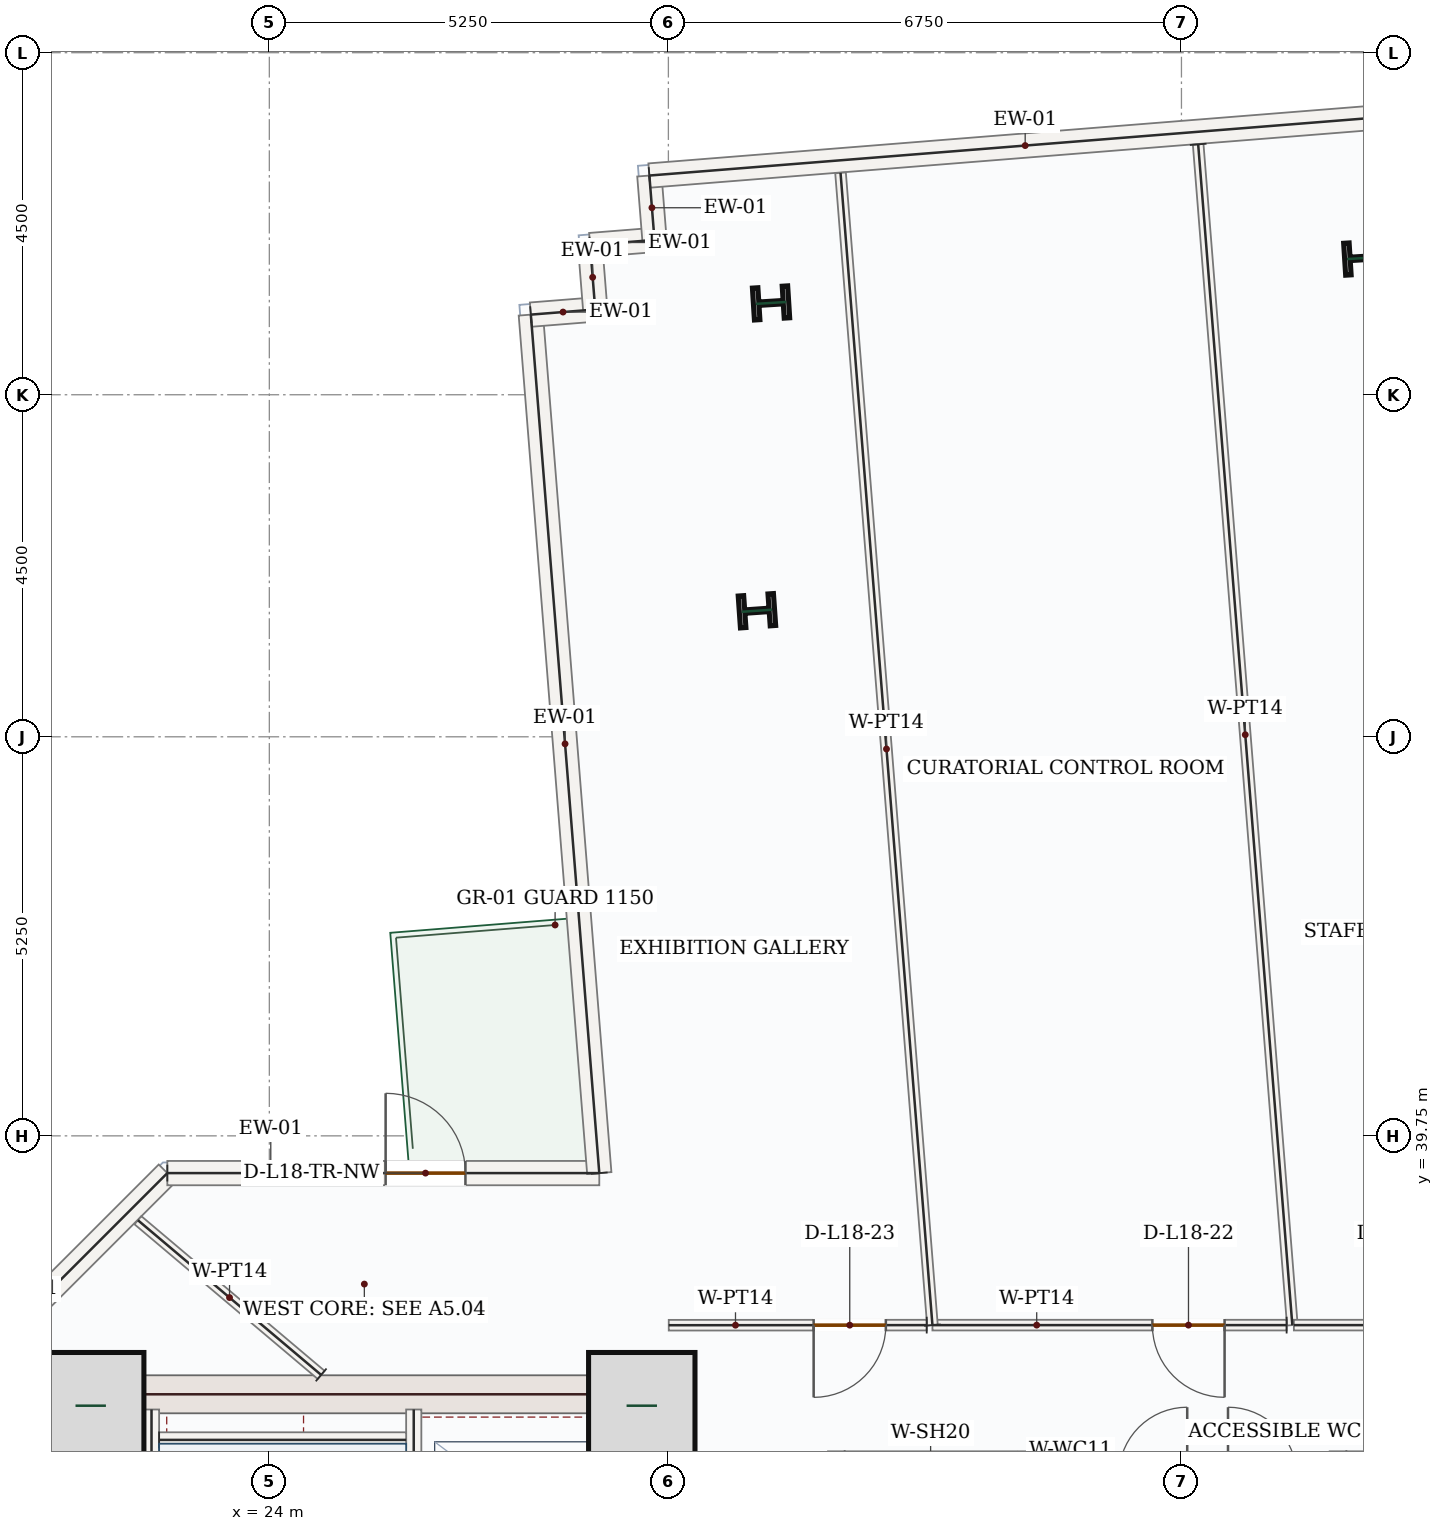
"""IFC4 building model, lengths in metres.
Left out: names, types, materials, properties, quantities, classifications, styles, units other than length and angle.
Written with IfcOpenShell. Run it as: python <this file> out.ifc"""

import sys

from ifc_helpers import new_model, si_unit, direction, frame, frame_2d, origin, origin_2d, place, context, subcontext, project, spatial, rectangle, i_section, extrude, source, transform, mapped, element, fill, save


model = new_model("IFC4")
c1 = context("Model", 3, precision=1e-05, world=origin(), true_north=direction((0.0, 1.0)))
c2 = subcontext(c1, "Body", "Model", "MODEL_VIEW")
j1 = project(units=[si_unit("LENGTHUNIT", "METRE"), si_unit("PLANEANGLEUNIT", "RADIAN")], contexts=[c1])
p1 = place(None, origin())
s1 = spatial("IfcSite", under=j1, at=p1, CompositionType="ELEMENT")
p2 = place(p1, origin())
s2 = spatial("IfcBuilding", under=s1, at=p2, CompositionType="ELEMENT")
p3 = place(p2, frame((0.0, 0.0, 83.7)))
s3 = spatial("IfcBuildingStorey", under=s2, at=p3, CompositionType="ELEMENT", Elevation=83.7)
m1 = source(origin(), c2, "Body", "SweptSolid", [
    extrude(rectangle(XDim=8.55, YDim=0.5, at=frame_2d((4.275, 0.0))), origin(), (0.0, 0.0, 1.0), 3.95),
])
p4 = place(p3, frame((21.5, 28.05, 0.0), z_axis=(0.0, 0.0, 1.0), x_axis=(0.0, 1.0, 0.0)))
e1 = element("IfcWall", 1, at=p4, inside=s3, PredefinedType="SHEAR", context=c2, shape_type="MappedRepresentation", body=[
    mapped(m1, transform((0.0, 0.0, 0.0), x_axis=(1.0, 0.0, 0.0), y_axis=(0.0, 1.0, 0.0), z_axis=(0.0, 0.0, 1.0), scale=1.0)),
])
p5 = place(p3, frame((29.0, 28.05, 0.0), z_axis=(0.0, 0.0, 1.0), x_axis=(0.0, 1.0, 0.0)))
e2 = element("IfcWall", 2, at=p5, inside=s3, PredefinedType="SHEAR", context=c2, shape_type="SweptSolid", body=[
    extrude(rectangle(XDim=8.55, YDim=0.5, at=frame_2d((4.275, 0.0))), origin(), (0.0, 0.0, 1.0), 3.95),
])
p6 = place(p5, frame((1.5, 0.0, 0.0)))
e3 = element("IfcOpeningElement", 3, at=p6, cuts=e2, PredefinedType="OPENING", context=c2, shape_type="SweptSolid", body=[
    extrude(rectangle(XDim=1.1, YDim=2.2, at=frame_2d((0.55, 1.1))), frame((0.0, 0.26, 0.0), z_axis=(0.0, -1.0, 0.0), x_axis=(1.0, 0.0, 0.0)), (0.0, 0.0, 1.0), 0.52),
])
m2 = source(origin(), c2, "Body", "SweptSolid", [
    extrude(rectangle(XDim=7.0, YDim=0.5, at=frame_2d((3.5, 0.0))), origin(), (0.0, 0.0, 1.0), 3.95),
])
p7 = place(p3, frame((21.75, 36.35, 0.0), z_axis=(0.0, 0.0, 1.0), x_axis=(1.0, 0.0, 0.0)))
e4 = element("IfcWall", 4, at=p7, inside=s3, PredefinedType="SHEAR", context=c2, shape_type="MappedRepresentation", body=[
    mapped(m2, transform((0.0, 0.0, 0.0), x_axis=(1.0, 0.0, 0.0), y_axis=(0.0, 1.0, 0.0), z_axis=(0.0, 0.0, 1.0), scale=1.0)),
])
m3 = source(origin(), c2, "Body", "SweptSolid", [
    extrude(rectangle(XDim=1.4, YDim=1.4, at=origin_2d()), origin(), (0.0, 0.0, 1.0), 4.2),
])
for number, where, z_axis, x_axis in (
    (5, (21.65, 36.2, 0.0), (0.0, 0.0, 1.0), (1.0, 0.0, 0.0)),
    (6, (28.9, 36.2, 0.0), (0.0, 0.0, 1.0), (1.0, 0.0, 0.0)),
):
    element("IfcColumn", number, at=place(p3, frame(where, z_axis=z_axis, x_axis=x_axis)), inside=s3, PredefinedType="COLUMN", context=c2, shape_type="MappedRepresentation", body=[
        mapped(m3, transform((0.0, 0.0, 0.0), x_axis=(1.0, 0.0, 0.0), y_axis=(0.0, 1.0, 0.0), z_axis=(0.0, 0.0, 1.0), scale=1.0)),
    ])
m4 = source(origin(), c2, "Body", "SweptSolid", [
    extrude(i_section(OverallWidth=0.421, OverallDepth=0.465, WebThickness=0.045, FlangeThickness=0.073, FilletRadius=0.018, at=origin_2d()), origin(), (0.0, 0.0, 1.0), 4.2),
])
for number, where, z_axis, x_axis in (
    (7, (30.415, 46.658, 0.0), (0.0, 0.0, 1.0), (-0.07, 0.998, 0.0)),
    (8, (38.379, 51.297, 0.0), (0.0, 0.0, 1.0), (-0.063, 0.998, 0.0)),
    (9, (30.601, 50.708, 0.0), (0.0, 0.0, 1.0), (-0.063, 0.998, 0.0)),
):
    element("IfcColumn", number, at=place(p3, frame(where, z_axis=z_axis, x_axis=x_axis)), inside=s3, PredefinedType="COLUMN", context=c2, shape_type="MappedRepresentation", body=[
        mapped(m4, transform((0.0, 0.0, 0.0), x_axis=(1.0, 0.0, 0.0), y_axis=(0.0, 1.0, 0.0), z_axis=(0.0, 0.0, 1.0), scale=1.0)),
    ])
m5 = source(origin(), c2, "Body", "SweptSolid", [
    extrude(rectangle(XDim=5.258, YDim=0.32, at=frame_2d((2.629, 0.0))), origin(), (0.0, 0.0, 1.0), 3.95),
])
p8 = place(p3, frame((18.94, 35.542, 0.0), z_axis=(0.0, 0.0, 1.0), x_axis=(0.707106781187, 0.707106781187, 0.0)))
e10 = element("IfcWall", 10, at=p8, inside=s3, PredefinedType="SOLIDWALL", context=c2, shape_type="MappedRepresentation", body=[
    mapped(m5, transform((0.0, 0.0, 0.0), x_axis=(1.0, 0.0, 0.0), y_axis=(0.0, 1.0, 0.0), z_axis=(0.0, 0.0, 1.0), scale=1.0)),
])
p9 = place(p3, frame((22.658, 39.26, 0.0), z_axis=(0.0, 0.0, 1.0), x_axis=(1.0, 0.0, 0.0)))
e11 = element("IfcWall", 11, at=p9, inside=s3, PredefinedType="SOLIDWALL", context=c2, shape_type="SweptSolid", body=[
    extrude(rectangle(XDim=5.683, YDim=0.32, at=frame_2d((2.842, 0.0))), origin(), (0.0, 0.0, 1.0), 3.95),
])
p10 = place(p9, frame((2.872, 0.0, 0.0)))
e12 = element("IfcOpeningElement", 12, at=p10, cuts=e11, PredefinedType="OPENING", context=c2, shape_type="SweptSolid", body=[
    extrude(rectangle(XDim=1.05, YDim=2.15, at=frame_2d((0.525, 1.075))), frame((0.0, 0.17, 0.0), z_axis=(0.0, -1.0, 0.0), x_axis=(1.0, 0.0, 0.0)), (0.0, 0.0, 1.0), 0.34),
])
m6 = source(origin(), c2, "Body", "SweptSolid", [
    extrude(rectangle(XDim=11.33, YDim=0.32, at=frame_2d((5.665, 0.0))), origin(), (0.0, 0.0, 1.0), 3.95),
])
p11 = place(p3, frame((28.341, 39.26, 0.0), z_axis=(0.0, 0.0, 1.0), x_axis=(-0.079512268319, 0.996833887459, 0.0)))
e13 = element("IfcWall", 13, at=p11, inside=s3, PredefinedType="SOLIDWALL", context=c2, shape_type="MappedRepresentation", body=[
    mapped(m6, transform((0.0, 0.0, 0.0), x_axis=(1.0, 0.0, 0.0), y_axis=(0.0, 1.0, 0.0), z_axis=(0.0, 0.0, 1.0), scale=1.0)),
])
m7 = source(origin(), c2, "Body", "SweptSolid", [
    extrude(rectangle(XDim=0.85, YDim=0.32, at=frame_2d((0.425, 0.0))), origin(), (0.0, 0.0, 1.0), 3.95),
])
for number, where, z_axis, x_axis in (
    (14, (27.44, 50.554, 0.0), (0.0, 0.0, 1.0), (0.997, 0.079, 0.0)),
    (15, (28.288, 50.622, 0.0), (0.0, 0.0, 1.0), (-0.08, 0.997, 0.0)),
    (16, (28.22, 51.469, 0.0), (0.0, 0.0, 1.0), (0.997, 0.08, 0.0)),
):
    element("IfcWall", number, at=place(p3, frame(where, z_axis=z_axis, x_axis=x_axis)), inside=s3, PredefinedType="SOLIDWALL", context=c2, shape_type="MappedRepresentation", body=[
        mapped(m7, transform((0.0, 0.0, 0.0), x_axis=(1.0, 0.0, 0.0), y_axis=(0.0, 1.0, 0.0), z_axis=(0.0, 0.0, 1.0), scale=1.0)),
    ])
m8 = source(origin(), c2, "Body", "SweptSolid", [
    extrude(rectangle(XDim=0.85, YDim=0.32, at=frame_2d((0.425, 0.0))), origin(), (0.0, 0.0, 1.0), 3.95),
])
p12 = place(p3, frame((29.067, 51.537, 0.0), z_axis=(0.0, 0.0, 1.0), x_axis=(-0.079573954853, 0.996828965123, 0.0)))
e17 = element("IfcWall", 17, at=p12, inside=s3, PredefinedType="SOLIDWALL", context=c2, shape_type="MappedRepresentation", body=[
    mapped(m8, transform((0.0, 0.0, 0.0), x_axis=(1.0, 0.0, 0.0), y_axis=(0.0, 1.0, 0.0), z_axis=(0.0, 0.0, 1.0), scale=1.0)),
])
m9 = source(origin(), c2, "Body", "SweptSolid", [
    extrude(rectangle(XDim=9.92, YDim=0.32, at=frame_2d((4.96, 0.0))), origin(), (0.0, 0.0, 1.0), 3.95),
])
p13 = place(p3, frame((29.0, 52.384, 0.0), z_axis=(0.0, 0.0, 1.0), x_axis=(0.996833485558, 0.079517306731, 0.0)))
e18 = element("IfcWall", 18, at=p13, inside=s3, PredefinedType="SOLIDWALL", context=c2, shape_type="MappedRepresentation", body=[
    mapped(m9, transform((0.0, 0.0, 0.0), x_axis=(1.0, 0.0, 0.0), y_axis=(0.0, 1.0, 0.0), z_axis=(0.0, 0.0, 1.0), scale=1.0)),
])
m10 = source(origin(), c2, "Body", "SweptSolid", [
    extrude(rectangle(XDim=7.87, YDim=0.2, at=frame_2d((3.935, 0.0))), origin(), (0.0, 0.0, 1.0), 3.95),
])
p14 = place(p3, frame((22.45, 28.28, 0.0), z_axis=(0.0, 0.0, 1.0), x_axis=(0.0, 1.0, 0.0)))
e19 = element("IfcWall", 19, at=p14, inside=s3, PredefinedType="SOLIDWALL", context=c2, shape_type="MappedRepresentation", body=[
    mapped(m10, transform((0.0, 0.0, 0.0), x_axis=(1.0, 0.0, 0.0), y_axis=(0.0, 1.0, 0.0), z_axis=(0.0, 0.0, 1.0), scale=1.0)),
])
p15 = place(p3, frame((25.9, 28.15, 0.0), z_axis=(0.0, 0.0, 1.0), x_axis=(0.0, 1.0, 0.0)))
e20 = element("IfcWall", 20, at=p15, inside=s3, PredefinedType="SOLIDWALL", context=c2, shape_type="SweptSolid", body=[
    extrude(rectangle(XDim=8.0, YDim=0.2, at=frame_2d((4.0, 0.0))), origin(), (0.0, 0.0, 1.0), 3.95),
])
p16 = place(p15, frame((0.4, 0.0, 0.0)))
e21 = element("IfcOpeningElement", 21, at=p16, cuts=e20, PredefinedType="OPENING", context=c2, shape_type="SweptSolid", body=[
    extrude(rectangle(XDim=1.05, YDim=2.15, at=frame_2d((0.525, 1.075))), frame((0.0, 0.11, 0.0), z_axis=(0.0, -1.0, 0.0), x_axis=(1.0, 0.0, 0.0)), (0.0, 0.0, 1.0), 0.22),
])
m11 = source(origin(), c2, "Body", "SweptSolid", [
    extrude(rectangle(XDim=3.25, YDim=0.2, at=frame_2d((1.625, 0.0))), origin(), (0.0, 0.0, 1.0), 3.95),
])
p17 = place(p3, frame((22.55, 35.75, 0.0), z_axis=(0.0, 0.0, 1.0), x_axis=(1.0, 0.0, 0.0)))
e22 = element("IfcWall", 22, at=p17, inside=s3, PredefinedType="SOLIDWALL", context=c2, shape_type="MappedRepresentation", body=[
    mapped(m11, transform((0.0, 0.0, 0.0), x_axis=(1.0, 0.0, 0.0), y_axis=(0.0, 1.0, 0.0), z_axis=(0.0, 0.0, 1.0), scale=1.0)),
])
m12 = source(origin(), c2, "Body", "SweptSolid", [
    extrude(rectangle(XDim=2.4, YDim=0.2, at=frame_2d((1.2, 0.0))), origin(), (0.0, 0.0, 1.0), 3.95),
])
for number, where, z_axis, x_axis in (
    (23, (31.45, 33.2, 0.0), (0.0, 0.0, 1.0), (0.0, 1.0, 0.0)),
    (24, (33.95, 33.2, 0.0), (0.0, 0.0, 1.0), (0.0, 1.0, 0.0)),
    (25, (38.05, 33.2, 0.0), (0.0, 0.0, 1.0), (0.0, 1.0, 0.0)),
):
    element("IfcWall", number, at=place(p3, frame(where, z_axis=z_axis, x_axis=x_axis)), inside=s3, PredefinedType="SOLIDWALL", context=c2, shape_type="MappedRepresentation", body=[
        mapped(m12, transform((0.0, 0.0, 0.0), x_axis=(1.0, 0.0, 0.0), y_axis=(0.0, 1.0, 0.0), z_axis=(0.0, 0.0, 1.0), scale=1.0)),
    ])
m13 = source(origin(), c2, "Body", "SweptSolid", [
    extrude(rectangle(XDim=15.583, YDim=0.14, at=frame_2d((7.792, 0.0))), origin(), (0.0, 0.0, 1.0), 3.95),
])
p18 = place(p3, frame((36.22, 52.794, 0.0), z_axis=(0.0, 0.0, 1.0), x_axis=(0.079507979427, -0.996834229552, 0.0)))
e26 = element("IfcWall", 26, at=p18, inside=s3, PredefinedType="PARTITIONING", context=c2, shape_type="MappedRepresentation", body=[
    mapped(m13, transform((0.0, 0.0, 0.0), x_axis=(1.0, 0.0, 0.0), y_axis=(0.0, 1.0, 0.0), z_axis=(0.0, 0.0, 1.0), scale=1.0)),
])
p19 = place(p3, frame((37.384, 37.26, 0.0), z_axis=(0.0, 0.0, 1.0), x_axis=(-1.0, 0.0, 0.0)))
e27 = element("IfcWall", 27, at=p19, inside=s3, PredefinedType="PARTITIONING", context=c2, shape_type="SweptSolid", body=[
    extrude(rectangle(XDim=4.66, YDim=0.14, at=frame_2d((2.33, 0.0))), origin(), (0.0, 0.0, 1.0), 3.95),
])
p20 = place(p19, frame((0.816, 0.0, 0.0)))
e28 = element("IfcOpeningElement", 28, at=p20, cuts=e27, PredefinedType="OPENING", context=c2, shape_type="SweptSolid", body=[
    extrude(rectangle(XDim=0.95, YDim=2.15, at=frame_2d((0.475, 1.075))), frame((0.0, 0.08, 0.0), z_axis=(0.0, -1.0, 0.0), x_axis=(1.0, 0.0, 0.0)), (0.0, 0.0, 1.0), 0.16),
])
m14 = source(origin(), c2, "Body", "SweptSolid", [
    extrude(rectangle(XDim=15.207, YDim=0.14, at=frame_2d((7.604, 0.0))), origin(), (0.0, 0.0, 1.0), 3.95),
])
p21 = place(p3, frame((32.724, 37.26, 0.0), z_axis=(0.0, 0.0, 1.0), x_axis=(-0.07950146843, 0.996834748851, 0.0)))
e29 = element("IfcWall", 29, at=p21, inside=s3, PredefinedType="PARTITIONING", context=c2, shape_type="MappedRepresentation", body=[
    mapped(m14, transform((0.0, 0.0, 0.0), x_axis=(1.0, 0.0, 0.0), y_axis=(0.0, 1.0, 0.0), z_axis=(0.0, 0.0, 1.0), scale=1.0)),
])
p22 = place(p3, frame((32.649, 37.26, 0.0), z_axis=(0.0, 0.0, 1.0), x_axis=(-0.999999935313, -0.00035968633, 0.0)))
e30 = element("IfcWall", 30, at=p22, inside=s3, PredefinedType="PARTITIONING", context=c2, shape_type="SweptSolid", body=[
    extrude(rectangle(XDim=3.394, YDim=0.14, at=frame_2d((1.697, 0.0))), origin(), (0.0, 0.0, 1.0), 3.95),
])
p23 = place(p22, frame((0.538, 0.0, 0.0)))
e31 = element("IfcOpeningElement", 31, at=p23, cuts=e30, PredefinedType="OPENING", context=c2, shape_type="SweptSolid", body=[
    extrude(rectangle(XDim=0.95, YDim=2.15, at=frame_2d((0.475, 1.075))), frame((0.0, 0.08, 0.0), z_axis=(0.0, -1.0, 0.0), x_axis=(1.0, 0.0, 0.0)), (0.0, 0.0, 1.0), 0.16),
])
m15 = source(origin(), c2, "Body", "SweptSolid", [
    extrude(rectangle(XDim=3.155, YDim=0.14, at=frame_2d((1.577, 0.0))), origin(), (0.0, 0.0, 1.0), 3.95),
])
p24 = place(p3, frame((24.682, 36.605, 0.0), z_axis=(0.0, 0.0, 1.0), x_axis=(-0.76411384058, 0.645081420159, 0.0)))
e32 = element("IfcWall", 32, at=p24, inside=s3, PredefinedType="PARTITIONING", context=c2, shape_type="MappedRepresentation", body=[
    mapped(m15, transform((0.0, 0.0, 0.0), x_axis=(1.0, 0.0, 0.0), y_axis=(0.0, 1.0, 0.0), z_axis=(0.0, 0.0, 1.0), scale=1.0)),
])
p25 = place(p3, frame((42.742, 37.26, 0.0), z_axis=(0.0, 0.0, 1.0), x_axis=(-0.999999998924, 4.6384341e-05, 0.0)))
e33 = element("IfcWall", 33, at=p25, inside=s3, PredefinedType="PARTITIONING", context=c2, shape_type="SweptSolid", body=[
    extrude(rectangle(XDim=5.263, YDim=0.14, at=frame_2d((2.632, 0.0))), origin(), (0.0, 0.0, 1.0), 3.95),
])
p26 = place(p25, frame((3.365, 0.0, 0.0)))
e34 = element("IfcOpeningElement", 34, at=p26, cuts=e33, PredefinedType="OPENING", context=c2, shape_type="SweptSolid", body=[
    extrude(rectangle(XDim=0.95, YDim=2.15, at=frame_2d((0.475, 1.075))), frame((0.0, 0.08, 0.0), z_axis=(0.0, -1.0, 0.0), x_axis=(1.0, 0.0, 0.0)), (0.0, 0.0, 1.0), 0.16),
])
m16 = source(origin(), c2, "Body", "SweptSolid", [
    extrude(rectangle(XDim=1.05, YDim=2.15, at=frame_2d((0.525, 1.075))), frame((0.0, 0.025, 0.0), z_axis=(0.0, -1.0, 0.0), x_axis=(1.0, 0.0, 0.0)), (0.0, 0.0, 1.0), 0.05),
])
p27 = place(p10, origin())
e35 = element("IfcDoor", 35, at=p27, inside=s3, OperationType="SINGLE_SWING_LEFT", PredefinedType="DOOR", context=c2, shape_type="MappedRepresentation", body=[
    mapped(m16, transform((0.0, 0.0, 0.0), x_axis=(1.0, 0.0, 0.0), y_axis=(0.0, 1.0, 0.0), z_axis=(0.0, 0.0, 1.0), scale=1.0)),
])
fill(e12, e35)
m17 = source(origin(), c2, "Body", "SweptSolid", [
    extrude(rectangle(XDim=0.95, YDim=2.15, at=frame_2d((0.475, 1.075))), frame((0.0, 0.025, 0.0), z_axis=(0.0, -1.0, 0.0), x_axis=(1.0, 0.0, 0.0)), (0.0, 0.0, 1.0), 0.05),
])
p28 = place(p20, origin())
e36 = element("IfcDoor", 36, at=p28, inside=s3, OperationType="SINGLE_SWING_LEFT", PredefinedType="DOOR", context=c2, shape_type="MappedRepresentation", body=[
    mapped(m17, transform((0.0, 0.0, 0.0), x_axis=(1.0, 0.0, 0.0), y_axis=(0.0, 1.0, 0.0), z_axis=(0.0, 0.0, 1.0), scale=1.0)),
])
fill(e28, e36)
p29 = place(p23, origin())
e37 = element("IfcDoor", 37, at=p29, inside=s3, OperationType="SINGLE_SWING_RIGHT", PredefinedType="DOOR", context=c2, shape_type="MappedRepresentation", body=[
    mapped(m17, transform((0.0, 0.0, 0.0), x_axis=(1.0, 0.0, 0.0), y_axis=(0.0, 1.0, 0.0), z_axis=(0.0, 0.0, 1.0), scale=1.0)),
])
fill(e31, e37)
save(model, sys.argv[1])
